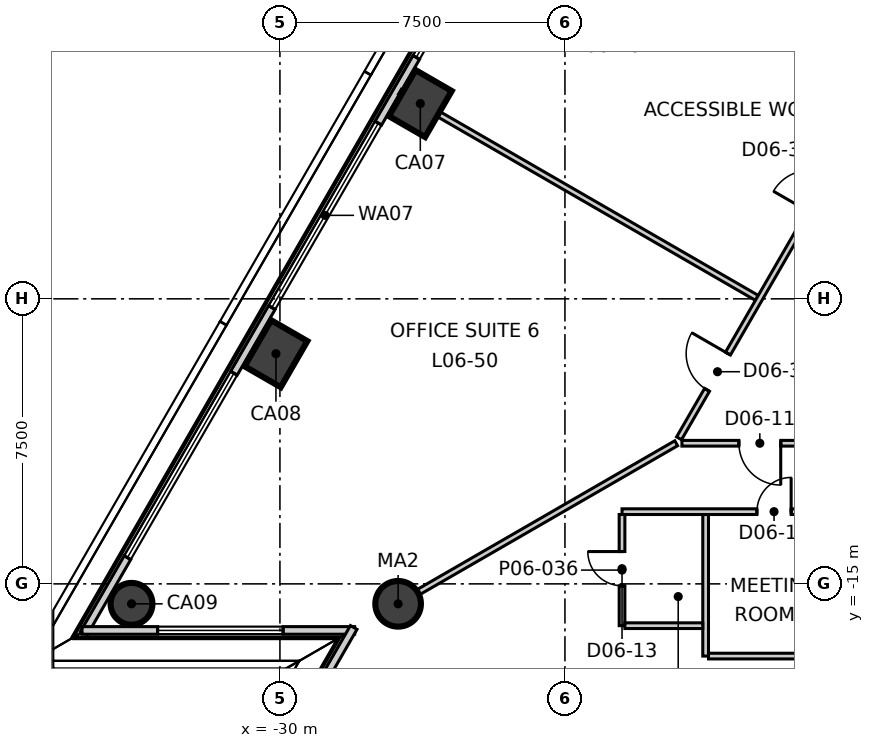
"""IFC4 building model, lengths in metres.
Left out: names, types, materials, properties, quantities, classifications, styles, units other than length and angle.
Written with IfcOpenShell. Run it as: python <this file> out.ifc"""

import sys

from ifc_helpers import new_model, si_unit, direction, frame, frame_2d, origin, origin_2d, place, context, subcontext, project, spatial, rectangle, circle, extrude, element, fill, save


model = new_model("IFC4")
c1 = context("Model", 3, precision=1e-05, world=origin(), true_north=direction((0.0, 1.0)))
c2 = subcontext(c1, "Body", "Model", "MODEL_VIEW")
j1 = project(units=[si_unit("LENGTHUNIT", "METRE"), si_unit("PLANEANGLEUNIT", "RADIAN")], contexts=[c1])
p1 = place(None, origin())
s1 = spatial("IfcSite", under=j1, at=p1, CompositionType="ELEMENT")
p2 = place(p1, origin())
s2 = spatial("IfcBuilding", under=s1, at=p2, CompositionType="ELEMENT")
p3 = place(p2, frame((0.0, 0.0, 35.3)))
s3 = spatial("IfcBuildingStorey", under=s2, at=p3, CompositionType="ELEMENT", Elevation=35.3)
for number, where, z_axis, x_axis in (
    (1, (-26.306, -2.362, -0.3), (0.0, 0.0, 1.0), (0.5, 0.866, 0.0)),
    (2, (-30.105, -8.944, -0.3), (0.0, 0.0, 1.0), (0.5, 0.866, 0.0)),
):
    element("IfcColumn", number, at=place(p3, frame(where, z_axis=z_axis, x_axis=x_axis)), inside=s3, PredefinedType="COLUMN", context=c2, shape_type="SweptSolid", body=[
        extrude(rectangle(XDim=1.4, YDim=1.1, at=origin_2d()), origin(), (0.0, 0.0, 1.0), 4.0),
    ])
p4 = place(p3, frame((-33.905, -15.525, -0.3), z_axis=(0.0, 0.0, 1.0), x_axis=(0.5, 0.866025403784, 0.0)))
e3 = element("IfcColumn", 3, at=p4, inside=s3, PredefinedType="COLUMN", context=c2, shape_type="SweptSolid", body=[
    extrude(circle(Radius=0.55, at=origin_2d()), origin(), (0.0, 0.0, 1.0), 4.0),
])
p5 = place(p3, frame((-26.89, -15.525, -0.3), z_axis=(0.0, 0.0, 1.0), x_axis=(1.0, 0.0, 0.0)))
e4 = element("IfcColumn", 4, at=p5, inside=s3, PredefinedType="COLUMN", context=c2, shape_type="SweptSolid", body=[
    extrude(circle(Radius=0.6, at=origin_2d()), origin(), (0.0, 0.0, 1.0), 4.0),
])
p6 = place(p3, frame((-3.462, 38.603, 0.0), z_axis=(0.0, 0.0, 1.0), x_axis=(-0.500012207976, -0.866018355391, 0.0)))
e5 = element("IfcWall", 5, at=p6, inside=s3, PredefinedType="ELEMENTEDWALL", context=c2, shape_type="SweptSolid", body=[
    extrude(rectangle(XDim=63.381, YDim=0.2, at=frame_2d((31.69, 0.0))), origin(), (0.0, 0.0, 1.0), 3.7),
])
p7 = place(p6, frame((2.302, 0.0, 0.9)))
e6 = element("IfcOpeningElement", 6, at=p7, cuts=e5, PredefinedType="OPENING", context=c2, shape_type="SweptSolid", body=[
    extrude(rectangle(XDim=5.6, YDim=2.5, at=frame_2d((2.8, 1.25))), frame((0.0, 0.11, 0.0), z_axis=(0.0, -1.0, 0.0), x_axis=(1.0, 0.0, 0.0)), (0.0, 0.0, 1.0), 0.22),
])
p8 = place(p6, frame((9.902, 0.0, 0.9)))
e7 = element("IfcOpeningElement", 7, at=p8, cuts=e5, PredefinedType="OPENING", context=c2, shape_type="SweptSolid", body=[
    extrude(rectangle(XDim=5.6, YDim=2.5, at=frame_2d((2.8, 1.25))), frame((0.0, 0.11, 0.0), z_axis=(0.0, -1.0, 0.0), x_axis=(1.0, 0.0, 0.0)), (0.0, 0.0, 1.0), 0.22),
])
p9 = place(p6, frame((17.501, 0.0, 0.9)))
e8 = element("IfcOpeningElement", 8, at=p9, cuts=e5, PredefinedType="OPENING", context=c2, shape_type="SweptSolid", body=[
    extrude(rectangle(XDim=5.6, YDim=2.5, at=frame_2d((2.8, 1.25))), frame((0.0, 0.11, 0.0), z_axis=(0.0, -1.0, 0.0), x_axis=(1.0, 0.0, 0.0)), (0.0, 0.0, 1.0), 0.22),
])
p10 = place(p6, frame((25.1, 0.0, 0.9)))
e9 = element("IfcOpeningElement", 9, at=p10, cuts=e5, PredefinedType="OPENING", context=c2, shape_type="SweptSolid", body=[
    extrude(rectangle(XDim=5.6, YDim=2.5, at=frame_2d((2.8, 1.25))), frame((0.0, 0.11, 0.0), z_axis=(0.0, -1.0, 0.0), x_axis=(1.0, 0.0, 0.0)), (0.0, 0.0, 1.0), 0.22),
])
p11 = place(p6, frame((32.7, 0.0, 0.9)))
e10 = element("IfcOpeningElement", 10, at=p11, cuts=e5, PredefinedType="OPENING", context=c2, shape_type="SweptSolid", body=[
    extrude(rectangle(XDim=5.6, YDim=2.5, at=frame_2d((2.8, 1.25))), frame((0.0, 0.11, 0.0), z_axis=(0.0, -1.0, 0.0), x_axis=(1.0, 0.0, 0.0)), (0.0, 0.0, 1.0), 0.22),
])
p12 = place(p6, frame((40.299, 0.0, 0.9)))
e11 = element("IfcOpeningElement", 11, at=p12, cuts=e5, PredefinedType="OPENING", context=c2, shape_type="SweptSolid", body=[
    extrude(rectangle(XDim=5.6, YDim=2.5, at=frame_2d((2.8, 1.25))), frame((0.0, 0.11, 0.0), z_axis=(0.0, -1.0, 0.0), x_axis=(1.0, 0.0, 0.0)), (0.0, 0.0, 1.0), 0.22),
])
p13 = place(p6, frame((47.899, 0.0, 0.9)))
e12 = element("IfcOpeningElement", 12, at=p13, cuts=e5, PredefinedType="OPENING", context=c2, shape_type="SweptSolid", body=[
    extrude(rectangle(XDim=5.6, YDim=2.5, at=frame_2d((2.8, 1.25))), frame((0.0, 0.11, 0.0), z_axis=(0.0, -1.0, 0.0), x_axis=(1.0, 0.0, 0.0)), (0.0, 0.0, 1.0), 0.22),
])
p14 = place(p6, frame((55.498, 0.0, 0.9)))
e13 = element("IfcOpeningElement", 13, at=p14, cuts=e5, PredefinedType="OPENING", context=c2, shape_type="SweptSolid", body=[
    extrude(rectangle(XDim=5.6, YDim=2.5, at=frame_2d((2.8, 1.25))), frame((0.0, 0.11, 0.0), z_axis=(0.0, -1.0, 0.0), x_axis=(1.0, 0.0, 0.0)), (0.0, 0.0, 1.0), 0.22),
])
p15 = place(p3, frame((-35.208, -16.225, 0.0), z_axis=(0.0, 0.0, 1.0), x_axis=(1.0, 0.0, 0.0)))
e14 = element("IfcWall", 14, at=p15, inside=s3, PredefinedType="ELEMENTEDWALL", context=c2, shape_type="SweptSolid", body=[
    extrude(rectangle(XDim=7.175, YDim=0.2, at=frame_2d((3.587, 0.0))), origin(), (0.0, 0.0, 1.0), 3.7),
])
p16 = place(p15, frame((1.99, 0.0, 0.9)))
e15 = element("IfcOpeningElement", 15, at=p16, cuts=e14, PredefinedType="OPENING", context=c2, shape_type="SweptSolid", body=[
    extrude(rectangle(XDim=3.3, YDim=2.5, at=frame_2d((1.65, 1.25))), frame((0.0, 0.11, 0.0), z_axis=(0.0, -1.0, 0.0), x_axis=(1.0, 0.0, 0.0)), (0.0, 0.0, 1.0), 0.22),
])
p17 = place(p3, frame((-28.058, -16.147, 0.0), z_axis=(0.0, 0.0, 1.0), x_axis=(-0.499915874128, -0.866073968431, 0.0)))
e16 = element("IfcWall", 16, at=p17, inside=s3, PredefinedType="ELEMENTEDWALL", context=c2, shape_type="SweptSolid", body=[
    extrude(rectangle(XDim=7.175, YDim=0.2, at=frame_2d((3.587, 0.0))), origin(), (0.0, 0.0, 1.0), 3.7),
])
p18 = place(p17, frame((1.39, 0.0, 0.9)))
e17 = element("IfcOpeningElement", 17, at=p18, cuts=e16, PredefinedType="OPENING", context=c2, shape_type="SweptSolid", body=[
    extrude(rectangle(XDim=3.3, YDim=2.5, at=frame_2d((1.65, 1.25))), frame((0.0, 0.11, 0.0), z_axis=(0.0, -1.0, 0.0), x_axis=(1.0, 0.0, 0.0)), (0.0, 0.0, 1.0), 0.22),
])
p19 = place(p3, frame((-27.427, -15.835, 0.0), z_axis=(0.0, 0.0, 1.0), x_axis=(0.866033184421, 0.499986523299, 0.0)))
e18 = element("IfcWall", 18, at=p19, inside=s3, PredefinedType="PARTITIONING", context=c2, shape_type="SweptSolid", body=[
    extrude(rectangle(XDim=9.07, YDim=0.15, at=frame_2d((4.535, 0.0))), origin(), (0.0, 0.0, 1.0), 3.05),
])
p20 = place(p3, frame((-26.843, -2.052, 0.0), z_axis=(0.0, 0.0, 1.0), x_axis=(0.86602515287, -0.500000434597, 0.0)))
e19 = element("IfcWall", 19, at=p20, inside=s3, PredefinedType="PARTITIONING", context=c2, shape_type="SweptSolid", body=[
    extrude(rectangle(XDim=10.846, YDim=0.15, at=frame_2d((5.423, 0.0))), origin(), (0.0, 0.0, 1.0), 3.7),
])
p21 = place(p3, frame((-19.497, -11.17, 0.0), z_axis=(0.0, 0.0, 1.0), x_axis=(0.499998854553, 0.866026065108, 0.0)))
e20 = element("IfcWall", 20, at=p21, inside=s3, PredefinedType="PARTITIONING", context=c2, shape_type="SweptSolid", body=[
    extrude(rectangle(XDim=38.994, YDim=0.15, at=frame_2d((19.497, 0.0))), origin(), (0.0, 0.0, 1.0), 3.7),
])
p22 = place(p21, frame((36.244, 0.0, 0.0)))
e21 = element("IfcOpeningElement", 21, at=p22, cuts=e20, PredefinedType="OPENING", context=c2, shape_type="SweptSolid", body=[
    extrude(rectangle(XDim=1.1, YDim=2.1, at=frame_2d((0.55, 1.05))), frame((0.0, 0.085, 0.0), z_axis=(0.0, -1.0, 0.0), x_axis=(1.0, 0.0, 0.0)), (0.0, 0.0, 1.0), 0.17),
])
p23 = place(p21, frame((29.171, 0.0, 0.0)))
e22 = element("IfcOpeningElement", 22, at=p23, cuts=e20, PredefinedType="OPENING", context=c2, shape_type="SweptSolid", body=[
    extrude(rectangle(XDim=1.0, YDim=2.1, at=frame_2d((0.5, 1.05))), frame((0.0, 0.085, 0.0), z_axis=(0.0, -1.0, 0.0), x_axis=(1.0, 0.0, 0.0)), (0.0, 0.0, 1.0), 0.17),
])
p24 = place(p21, frame((32.971, 0.0, 0.0)))
e23 = element("IfcOpeningElement", 23, at=p24, cuts=e20, PredefinedType="OPENING", context=c2, shape_type="SweptSolid", body=[
    extrude(rectangle(XDim=0.9, YDim=2.1, at=frame_2d((0.45, 1.05))), frame((0.0, 0.085, 0.0), z_axis=(0.0, -1.0, 0.0), x_axis=(1.0, 0.0, 0.0)), (0.0, 0.0, 1.0), 0.17),
])
p25 = place(p21, frame((22.771, 0.0, 0.0)))
e24 = element("IfcOpeningElement", 24, at=p25, cuts=e20, PredefinedType="OPENING", context=c2, shape_type="SweptSolid", body=[
    extrude(rectangle(XDim=1.0, YDim=2.1, at=frame_2d((0.5, 1.05))), frame((0.0, 0.085, 0.0), z_axis=(0.0, -1.0, 0.0), x_axis=(1.0, 0.0, 0.0)), (0.0, 0.0, 1.0), 0.17),
])
p26 = place(p21, frame((6.872, 0.0, 0.0)))
e25 = element("IfcOpeningElement", 25, at=p26, cuts=e20, PredefinedType="OPENING", context=c2, shape_type="SweptSolid", body=[
    extrude(rectangle(XDim=1.1, YDim=2.1, at=frame_2d((0.55, 1.05))), frame((0.0, 0.085, 0.0), z_axis=(0.0, -1.0, 0.0), x_axis=(1.0, 0.0, 0.0)), (0.0, 0.0, 1.0), 0.17),
])
p27 = place(p21, frame((17.372, 0.0, 0.0)))
e26 = element("IfcOpeningElement", 26, at=p27, cuts=e20, PredefinedType="OPENING", context=c2, shape_type="SweptSolid", body=[
    extrude(rectangle(XDim=0.9, YDim=2.1, at=frame_2d((0.45, 1.05))), frame((0.0, 0.085, 0.0), z_axis=(0.0, -1.0, 0.0), x_axis=(1.0, 0.0, 0.0)), (0.0, 0.0, 1.0), 0.17),
])
p28 = place(p21, frame((14.172, 0.0, 0.0)))
e27 = element("IfcOpeningElement", 27, at=p28, cuts=e20, PredefinedType="OPENING", context=c2, shape_type="SweptSolid", body=[
    extrude(rectangle(XDim=0.9, YDim=2.1, at=frame_2d((0.45, 1.05))), frame((0.0, 0.085, 0.0), z_axis=(0.0, -1.0, 0.0), x_axis=(1.0, 0.0, 0.0)), (0.0, 0.0, 1.0), 0.17),
])
p29 = place(p21, frame((11.272, 0.0, 0.0)))
e28 = element("IfcOpeningElement", 28, at=p29, cuts=e20, PredefinedType="OPENING", context=c2, shape_type="SweptSolid", body=[
    extrude(rectangle(XDim=1.0, YDim=2.1, at=frame_2d((0.5, 1.05))), frame((0.0, 0.085, 0.0), z_axis=(0.0, -1.0, 0.0), x_axis=(1.0, 0.0, 0.0)), (0.0, 0.0, 1.0), 0.17),
])
p30 = place(p21, frame((1.473, 0.0, 0.0)))
e29 = element("IfcOpeningElement", 29, at=p30, cuts=e20, PredefinedType="OPENING", context=c2, shape_type="SweptSolid", body=[
    extrude(rectangle(XDim=1.1, YDim=2.1, at=frame_2d((0.55, 1.05))), frame((0.0, 0.085, 0.0), z_axis=(0.0, -1.0, 0.0), x_axis=(1.0, 0.0, 0.0)), (0.0, 0.0, 1.0), 0.17),
])
p31 = place(p3, frame((-19.422, -11.3, 0.0), z_axis=(0.0, 0.0, 1.0), x_axis=(1.0, 0.0, 0.0)))
e30 = element("IfcWall", 30, at=p31, inside=s3, PredefinedType="PARTITIONING", context=c2, shape_type="SweptSolid", body=[
    extrude(rectangle(XDim=38.994, YDim=0.15, at=frame_2d((19.497, 0.0))), origin(), (0.0, 0.0, 1.0), 3.7),
])
p32 = place(p31, frame((1.5, 0.0, 0.0)))
e31 = element("IfcOpeningElement", 31, at=p32, cuts=e30, PredefinedType="OPENING", context=c2, shape_type="SweptSolid", body=[
    extrude(rectangle(XDim=1.1, YDim=2.1, at=frame_2d((0.55, 1.05))), frame((0.0, 0.085, 0.0), z_axis=(0.0, -1.0, 0.0), x_axis=(1.0, 0.0, 0.0)), (0.0, 0.0, 1.0), 0.17),
])
p33 = place(p31, frame((8.674, 0.0, 0.0)))
e32 = element("IfcOpeningElement", 32, at=p33, cuts=e30, PredefinedType="OPENING", context=c2, shape_type="SweptSolid", body=[
    extrude(rectangle(XDim=1.0, YDim=2.1, at=frame_2d((0.5, 1.05))), frame((0.0, 0.085, 0.0), z_axis=(0.0, -1.0, 0.0), x_axis=(1.0, 0.0, 0.0)), (0.0, 0.0, 1.0), 0.17),
])
p34 = place(p31, frame((4.974, 0.0, 0.0)))
e33 = element("IfcOpeningElement", 33, at=p34, cuts=e30, PredefinedType="OPENING", context=c2, shape_type="SweptSolid", body=[
    extrude(rectangle(XDim=0.9, YDim=2.1, at=frame_2d((0.45, 1.05))), frame((0.0, 0.085, 0.0), z_axis=(0.0, -1.0, 0.0), x_axis=(1.0, 0.0, 0.0)), (0.0, 0.0, 1.0), 0.17),
])
p35 = place(p31, frame((23.273, 0.0, 0.0)))
e34 = element("IfcOpeningElement", 34, at=p35, cuts=e30, PredefinedType="OPENING", context=c2, shape_type="SweptSolid", body=[
    extrude(rectangle(XDim=1.1, YDim=2.1, at=frame_2d((0.55, 1.05))), frame((0.0, 0.085, 0.0), z_axis=(0.0, -1.0, 0.0), x_axis=(1.0, 0.0, 0.0)), (0.0, 0.0, 1.0), 0.17),
])
p36 = place(p31, frame((12.973, 0.0, 0.0)))
e35 = element("IfcOpeningElement", 35, at=p36, cuts=e30, PredefinedType="OPENING", context=c2, shape_type="SweptSolid", body=[
    extrude(rectangle(XDim=0.9, YDim=2.1, at=frame_2d((0.45, 1.05))), frame((0.0, 0.085, 0.0), z_axis=(0.0, -1.0, 0.0), x_axis=(1.0, 0.0, 0.0)), (0.0, 0.0, 1.0), 0.17),
])
p37 = place(p31, frame((16.173, 0.0, 0.0)))
e36 = element("IfcOpeningElement", 36, at=p37, cuts=e30, PredefinedType="OPENING", context=c2, shape_type="SweptSolid", body=[
    extrude(rectangle(XDim=0.9, YDim=2.1, at=frame_2d((0.45, 1.05))), frame((0.0, 0.085, 0.0), z_axis=(0.0, -1.0, 0.0), x_axis=(1.0, 0.0, 0.0)), (0.0, 0.0, 1.0), 0.17),
])
p38 = place(p31, frame((18.873, 0.0, 0.0)))
e37 = element("IfcOpeningElement", 37, at=p38, cuts=e30, PredefinedType="OPENING", context=c2, shape_type="SweptSolid", body=[
    extrude(rectangle(XDim=1.0, YDim=2.1, at=frame_2d((0.5, 1.05))), frame((0.0, 0.085, 0.0), z_axis=(0.0, -1.0, 0.0), x_axis=(1.0, 0.0, 0.0)), (0.0, 0.0, 1.0), 0.17),
])
p39 = place(p31, frame((32.471, 0.0, 0.0)))
e38 = element("IfcOpeningElement", 38, at=p39, cuts=e30, PredefinedType="OPENING", context=c2, shape_type="SweptSolid", body=[
    extrude(rectangle(XDim=1.0, YDim=2.1, at=frame_2d((0.5, 1.05))), frame((0.0, 0.085, 0.0), z_axis=(0.0, -1.0, 0.0), x_axis=(1.0, 0.0, 0.0)), (0.0, 0.0, 1.0), 0.17),
])
p40 = place(p3, frame((-17.239, -0.208, 0.0), z_axis=(0.0, 0.0, 1.0), x_axis=(0.866031223622, -0.49998991961, 0.0)))
e39 = element("IfcWall", 39, at=p40, inside=s3, PredefinedType="PARTITIONING", context=c2, shape_type="SweptSolid", body=[
    extrude(rectangle(XDim=3.45, YDim=0.15, at=frame_2d((1.725, 0.0))), origin(), (0.0, 0.0, 1.0), 3.7),
])
p41 = place(p3, frame((-18.798, -16.9, 0.0), z_axis=(0.0, 0.0, 1.0), x_axis=(0.0, 1.0, 0.0)))
e40 = element("IfcWall", 40, at=p41, inside=s3, PredefinedType="PARTITIONING", context=c2, shape_type="SweptSolid", body=[
    extrude(rectangle(XDim=3.725, YDim=0.15, at=frame_2d((1.862, 0.0))), origin(), (0.0, 0.0, 1.0), 3.7),
])
p42 = place(p3, frame((-20.998, -13.1, 0.0), z_axis=(0.0, 0.0, 1.0), x_axis=(1.0, 0.0, 0.0)))
e41 = element("IfcWall", 41, at=p42, inside=s3, PredefinedType="PARTITIONING", context=c2, shape_type="SweptSolid", body=[
    extrude(rectangle(XDim=5.725, YDim=0.15, at=frame_2d((2.863, 0.0))), origin(), (0.0, 0.0, 1.0), 3.7),
])
p43 = place(p42, frame((3.55, 0.0, 0.0)))
e42 = element("IfcOpeningElement", 42, at=p43, cuts=e41, PredefinedType="OPENING", context=c2, shape_type="SweptSolid", body=[
    extrude(rectangle(XDim=0.9, YDim=2.1, at=frame_2d((0.45, 1.05))), frame((0.0, 0.085, 0.0), z_axis=(0.0, -1.0, 0.0), x_axis=(1.0, 0.0, 0.0)), (0.0, 0.0, 1.0), 0.17),
])
p44 = place(p3, frame((-20.998, -16.1, 0.0), z_axis=(0.0, 0.0, 1.0), x_axis=(0.0, 1.0, 0.0)))
e43 = element("IfcWall", 43, at=p44, inside=s3, PredefinedType="PARTITIONING", context=c2, shape_type="SweptSolid", body=[
    extrude(rectangle(XDim=2.925, YDim=0.15, at=frame_2d((1.462, 0.0))), origin(), (0.0, 0.0, 1.0), 3.7),
])
p45 = place(p44, frame((1.05, 0.0, 0.0)))
e44 = element("IfcOpeningElement", 44, at=p45, cuts=e43, PredefinedType="OPENING", context=c2, shape_type="SweptSolid", body=[
    extrude(rectangle(XDim=0.9, YDim=2.1, at=frame_2d((0.45, 1.05))), frame((0.0, 0.085, 0.0), z_axis=(0.0, -1.0, 0.0), x_axis=(1.0, 0.0, 0.0)), (0.0, 0.0, 1.0), 0.17),
])
p46 = place(p3, frame((-20.923, -16.1, 0.0), z_axis=(0.0, 0.0, 1.0), x_axis=(1.0, 0.0, 0.0)))
e45 = element("IfcWall", 45, at=p46, inside=s3, PredefinedType="PARTITIONING", context=c2, shape_type="SweptSolid", body=[
    extrude(rectangle(XDim=2.05, YDim=0.15, at=frame_2d((1.025, 0.0))), origin(), (0.0, 0.0, 1.0), 3.7),
])
p47 = place(p3, frame((-18.723, -16.9, 0.0), z_axis=(0.0, 0.0, 1.0), x_axis=(1.0, 0.0, 0.0)))
e46 = element("IfcWall", 46, at=p47, inside=s3, PredefinedType="PARTITIONING", context=c2, shape_type="SweptSolid", body=[
    extrude(rectangle(XDim=3.45, YDim=0.15, at=frame_2d((1.725, 0.0))), origin(), (0.0, 0.0, 1.0), 3.7),
])
p48 = place(p12, origin())
e47 = element("IfcWindow", 47, at=p48, inside=s3, PartitioningType="SINGLE_PANEL", PredefinedType="WINDOW", context=c2, shape_type="SweptSolid", body=[
    extrude(rectangle(XDim=5.6, YDim=2.5, at=frame_2d((2.8, 1.25))), frame((0.0, 0.03, 0.0), z_axis=(0.0, -1.0, 0.0), x_axis=(1.0, 0.0, 0.0)), (0.0, 0.0, 1.0), 0.06),
])
fill(e11, e47)
p49 = place(p13, origin())
e48 = element("IfcWindow", 48, at=p49, inside=s3, PartitioningType="SINGLE_PANEL", PredefinedType="WINDOW", context=c2, shape_type="SweptSolid", body=[
    extrude(rectangle(XDim=5.6, YDim=2.5, at=frame_2d((2.8, 1.25))), frame((0.0, 0.03, 0.0), z_axis=(0.0, -1.0, 0.0), x_axis=(1.0, 0.0, 0.0)), (0.0, 0.0, 1.0), 0.06),
])
fill(e12, e48)
p50 = place(p14, origin())
e49 = element("IfcWindow", 49, at=p50, inside=s3, PartitioningType="SINGLE_PANEL", PredefinedType="WINDOW", context=c2, shape_type="SweptSolid", body=[
    extrude(rectangle(XDim=5.6, YDim=2.5, at=frame_2d((2.8, 1.25))), frame((0.0, 0.03, 0.0), z_axis=(0.0, -1.0, 0.0), x_axis=(1.0, 0.0, 0.0)), (0.0, 0.0, 1.0), 0.06),
])
fill(e13, e49)
p51 = place(p16, origin())
e50 = element("IfcWindow", 50, at=p51, inside=s3, PartitioningType="SINGLE_PANEL", PredefinedType="WINDOW", context=c2, shape_type="SweptSolid", body=[
    extrude(rectangle(XDim=3.3, YDim=2.5, at=frame_2d((1.65, 1.25))), frame((0.0, 0.03, 0.0), z_axis=(0.0, -1.0, 0.0), x_axis=(1.0, 0.0, 0.0)), (0.0, 0.0, 1.0), 0.06),
])
fill(e15, e50)
p52 = place(p32, origin())
e51 = element("IfcDoor", 51, at=p52, inside=s3, OperationType="SINGLE_SWING_RIGHT", PredefinedType="DOOR", context=c2, shape_type="SweptSolid", body=[
    extrude(rectangle(XDim=1.1, YDim=2.1, at=frame_2d((0.55, 1.05))), frame((0.0, 0.025, 0.0), z_axis=(0.0, -1.0, 0.0), x_axis=(1.0, 0.0, 0.0)), (0.0, 0.0, 1.0), 0.05),
])
fill(e31, e51)
p53 = place(p43, origin())
e52 = element("IfcDoor", 52, at=p53, inside=s3, OperationType="SINGLE_SWING_LEFT", PredefinedType="DOOR", context=c2, shape_type="SweptSolid", body=[
    extrude(rectangle(XDim=0.9, YDim=2.1, at=frame_2d((0.45, 1.05))), frame((0.0, 0.025, 0.0), z_axis=(0.0, -1.0, 0.0), x_axis=(1.0, 0.0, 0.0)), (0.0, 0.0, 1.0), 0.05),
])
fill(e42, e52)
p54 = place(p45, origin())
e53 = element("IfcDoor", 53, at=p54, inside=s3, OperationType="SINGLE_SWING_LEFT", PredefinedType="DOOR", context=c2, shape_type="SweptSolid", body=[
    extrude(rectangle(XDim=0.9, YDim=2.1, at=frame_2d((0.45, 1.05))), frame((0.0, 0.025, 0.0), z_axis=(0.0, -1.0, 0.0), x_axis=(1.0, 0.0, 0.0)), (0.0, 0.0, 1.0), 0.05),
])
fill(e44, e53)
p55 = place(p30, origin())
e54 = element("IfcDoor", 54, at=p55, inside=s3, OperationType="SINGLE_SWING_LEFT", PredefinedType="DOOR", context=c2, shape_type="SweptSolid", body=[
    extrude(rectangle(XDim=1.1, YDim=2.1, at=frame_2d((0.55, 1.05))), frame((0.0, 0.025, 0.0), z_axis=(0.0, -1.0, 0.0), x_axis=(1.0, 0.0, 0.0)), (0.0, 0.0, 1.0), 0.05),
])
fill(e29, e54)
save(model, sys.argv[1])
